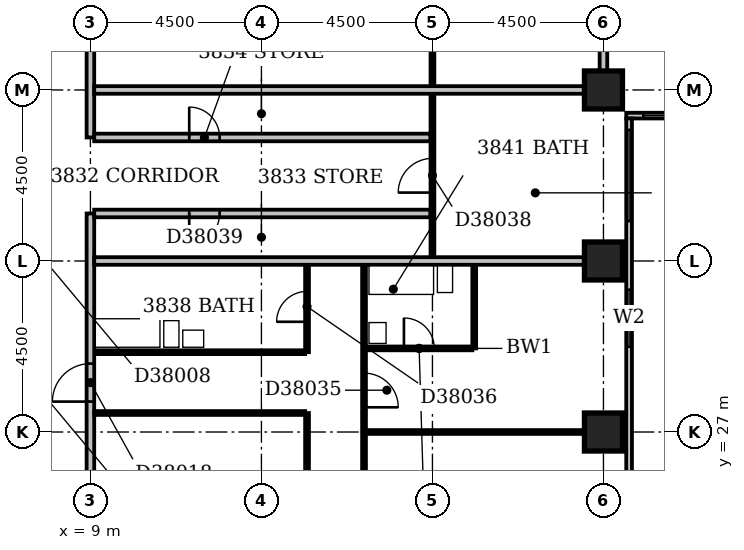
"""IFC4 building model, lengths in metres.
Left out: names, types, materials, properties, quantities, classifications, styles, units other than length and angle.
Written with IfcOpenShell. Run it as: python <this file> out.ifc"""

import sys

from ifc_helpers import new_model, si_unit, direction, frame, frame_2d, origin, origin_2d, place, context, subcontext, project, spatial, rectangle, extrude, element, fill, save


model = new_model("IFC4")
c1 = context("Model", 3, precision=1e-05, world=origin(), true_north=direction((0.0, 1.0)))
c2 = subcontext(c1, "Body", "Model", "MODEL_VIEW")
j1 = project(units=[si_unit("LENGTHUNIT", "METRE"), si_unit("PLANEANGLEUNIT", "RADIAN")], contexts=[c1])
p1 = place(None, origin())
s1 = spatial("IfcSite", under=j1, at=p1, CompositionType="ELEMENT")
p2 = place(p1, origin())
s2 = spatial("IfcBuilding", under=s1, at=p2, CompositionType="ELEMENT")
p3 = place(p2, frame((0.0, 0.0, 152.0)))
s3 = spatial("IfcBuildingStorey", under=s2, at=p3, CompositionType="ELEMENT", Elevation=152.0)
for number, where, z_axis, x_axis in (
    (1, (22.5, 27.0, -0.3), (0.0, 0.0, 1.0), (1.0, 0.0, 0.0)),
    (2, (22.5, 31.5, -0.3), (0.0, 0.0, 1.0), (1.0, 0.0, 0.0)),
    (3, (22.5, 36.0, -0.3), (0.0, 0.0, 1.0), (1.0, 0.0, 0.0)),
):
    element("IfcColumn", number, at=place(p3, frame(where, z_axis=z_axis, x_axis=x_axis)), inside=s3, PredefinedType="COLUMN", context=c2, shape_type="SweptSolid", body=[
        extrude(rectangle(XDim=1.0, YDim=1.0, at=origin_2d()), origin(), (0.0, 0.0, 1.0), 3.6),
    ])
p4 = place(p3, frame((23.175, 17.4, 0.0), z_axis=(0.0, 0.0, 1.0), x_axis=(0.0, 1.0, 0.0)))
e4 = element("IfcWall", 4, at=p4, inside=s3, PredefinedType="STANDARD", context=c2, shape_type="SweptSolid", body=[
    extrude(rectangle(XDim=17.85, YDim=0.15, at=frame_2d((8.925, 0.0))), origin(), (0.0, 0.0, 1.0), 2.7),
])
p5 = place(p4, frame((1.65, 0.0, 0.6)))
e5 = element("IfcOpeningElement", 5, at=p5, cuts=e4, PredefinedType="OPENING", context=c2, shape_type="SweptSolid", body=[
    extrude(rectangle(XDim=2.4, YDim=1.8, at=frame_2d((1.2, 0.9))), frame((0.0, 0.087, 0.0), z_axis=(0.0, -1.0, 0.0), x_axis=(1.0, 0.0, 0.0)), (0.0, 0.0, 1.0), 0.174),
])
p6 = place(p4, frame((6.15, 0.0, 0.6)))
e6 = element("IfcOpeningElement", 6, at=p6, cuts=e4, PredefinedType="OPENING", context=c2, shape_type="SweptSolid", body=[
    extrude(rectangle(XDim=2.4, YDim=1.8, at=frame_2d((1.2, 0.9))), frame((0.0, 0.087, 0.0), z_axis=(0.0, -1.0, 0.0), x_axis=(1.0, 0.0, 0.0)), (0.0, 0.0, 1.0), 0.174),
])
p7 = place(p4, frame((11.844, 0.0, 0.6)))
e7 = element("IfcOpeningElement", 7, at=p7, cuts=e4, PredefinedType="OPENING", context=c2, shape_type="SweptSolid", body=[
    extrude(rectangle(XDim=1.5, YDim=1.8, at=frame_2d((0.75, 0.9))), frame((0.0, 0.087, 0.0), z_axis=(0.0, -1.0, 0.0), x_axis=(1.0, 0.0, 0.0)), (0.0, 0.0, 1.0), 0.174),
])
p8 = place(p4, frame((15.15, 0.0, 0.6)))
e8 = element("IfcOpeningElement", 8, at=p8, cuts=e4, PredefinedType="OPENING", context=c2, shape_type="SweptSolid", body=[
    extrude(rectangle(XDim=2.4, YDim=1.8, at=frame_2d((1.2, 0.9))), frame((0.0, 0.087, 0.0), z_axis=(0.0, -1.0, 0.0), x_axis=(1.0, 0.0, 0.0)), (0.0, 0.0, 1.0), 0.174),
])
p9 = place(p3, frame((23.1, 35.325, 0.0), z_axis=(0.0, 0.0, 1.0), x_axis=(1.0, 0.0, 0.0)))
e9 = element("IfcWall", 9, at=p9, inside=s3, PredefinedType="STANDARD", context=c2, shape_type="SweptSolid", body=[
    extrude(rectangle(XDim=45.15, YDim=0.15, at=frame_2d((22.575, 0.0))), origin(), (0.0, 0.0, 1.0), 2.7),
])
p10 = place(p9, frame((0.45, 0.0, 0.6)))
e10 = element("IfcOpeningElement", 10, at=p10, cuts=e9, PredefinedType="OPENING", context=c2, shape_type="SweptSolid", body=[
    extrude(rectangle(XDim=2.4, YDim=1.8, at=frame_2d((1.2, 0.9))), frame((0.0, 0.087, 0.0), z_axis=(0.0, -1.0, 0.0), x_axis=(1.0, 0.0, 0.0)), (0.0, 0.0, 1.0), 0.174),
])
p11 = place(p9, frame((4.738, 0.0, 0.6)))
e11 = element("IfcOpeningElement", 11, at=p11, cuts=e9, PredefinedType="OPENING", context=c2, shape_type="SweptSolid", body=[
    extrude(rectangle(XDim=2.1, YDim=1.8, at=frame_2d((1.05, 0.9))), frame((0.0, 0.087, 0.0), z_axis=(0.0, -1.0, 0.0), x_axis=(1.0, 0.0, 0.0)), (0.0, 0.0, 1.0), 0.174),
])
p12 = place(p9, frame((9.45, 0.0, 0.6)))
e12 = element("IfcOpeningElement", 12, at=p12, cuts=e9, PredefinedType="OPENING", context=c2, shape_type="SweptSolid", body=[
    extrude(rectangle(XDim=2.4, YDim=1.8, at=frame_2d((1.2, 0.9))), frame((0.0, 0.087, 0.0), z_axis=(0.0, -1.0, 0.0), x_axis=(1.0, 0.0, 0.0)), (0.0, 0.0, 1.0), 0.174),
])
p13 = place(p9, frame((13.95, 0.0, 0.6)))
e13 = element("IfcOpeningElement", 13, at=p13, cuts=e9, PredefinedType="OPENING", context=c2, shape_type="SweptSolid", body=[
    extrude(rectangle(XDim=2.4, YDim=1.8, at=frame_2d((1.2, 0.9))), frame((0.0, 0.087, 0.0), z_axis=(0.0, -1.0, 0.0), x_axis=(1.0, 0.0, 0.0)), (0.0, 0.0, 1.0), 0.174),
])
p14 = place(p9, frame((19.34, 0.0, 0.6)))
e14 = element("IfcOpeningElement", 14, at=p14, cuts=e9, PredefinedType="OPENING", context=c2, shape_type="SweptSolid", body=[
    extrude(rectangle(XDim=1.8, YDim=1.8, at=frame_2d((0.9, 0.9))), frame((0.0, 0.087, 0.0), z_axis=(0.0, -1.0, 0.0), x_axis=(1.0, 0.0, 0.0)), (0.0, 0.0, 1.0), 0.174),
])
p15 = place(p9, frame((22.95, 0.0, 0.6)))
e15 = element("IfcOpeningElement", 15, at=p15, cuts=e9, PredefinedType="OPENING", context=c2, shape_type="SweptSolid", body=[
    extrude(rectangle(XDim=2.4, YDim=1.8, at=frame_2d((1.2, 0.9))), frame((0.0, 0.087, 0.0), z_axis=(0.0, -1.0, 0.0), x_axis=(1.0, 0.0, 0.0)), (0.0, 0.0, 1.0), 0.174),
])
p16 = place(p9, frame((27.45, 0.0, 0.6)))
e16 = element("IfcOpeningElement", 16, at=p16, cuts=e9, PredefinedType="OPENING", context=c2, shape_type="SweptSolid", body=[
    extrude(rectangle(XDim=2.4, YDim=1.8, at=frame_2d((1.2, 0.9))), frame((0.0, 0.087, 0.0), z_axis=(0.0, -1.0, 0.0), x_axis=(1.0, 0.0, 0.0)), (0.0, 0.0, 1.0), 0.174),
])
p17 = place(p9, frame((31.95, 0.0, 0.6)))
e17 = element("IfcOpeningElement", 17, at=p17, cuts=e9, PredefinedType="OPENING", context=c2, shape_type="SweptSolid", body=[
    extrude(rectangle(XDim=2.4, YDim=1.8, at=frame_2d((1.2, 0.9))), frame((0.0, 0.087, 0.0), z_axis=(0.0, -1.0, 0.0), x_axis=(1.0, 0.0, 0.0)), (0.0, 0.0, 1.0), 0.174),
])
p18 = place(p9, frame((38.27, 0.0, 0.6)))
e18 = element("IfcOpeningElement", 18, at=p18, cuts=e9, PredefinedType="OPENING", context=c2, shape_type="SweptSolid", body=[
    extrude(rectangle(XDim=0.9, YDim=1.8, at=frame_2d((0.45, 0.9))), frame((0.0, 0.087, 0.0), z_axis=(0.0, -1.0, 0.0), x_axis=(1.0, 0.0, 0.0)), (0.0, 0.0, 1.0), 0.174),
])
p19 = place(p9, frame((40.95, 0.0, 0.6)))
e19 = element("IfcOpeningElement", 19, at=p19, cuts=e9, PredefinedType="OPENING", context=c2, shape_type="SweptSolid", body=[
    extrude(rectangle(XDim=2.4, YDim=1.8, at=frame_2d((1.2, 0.9))), frame((0.0, 0.087, 0.0), z_axis=(0.0, -1.0, 0.0), x_axis=(1.0, 0.0, 0.0)), (0.0, 0.0, 1.0), 0.174),
])
p20 = place(p3, frame((9.0, 5.0, 0.0), z_axis=(0.0, 0.0, 1.0), x_axis=(0.0, 1.0, 0.0)))
e20 = element("IfcWall", 20, at=p20, inside=s3, PredefinedType="PARTITIONING", context=c2, shape_type="SweptSolid", body=[
    extrude(rectangle(XDim=27.75, YDim=0.2, at=frame_2d((13.875, 0.0))), origin(), (0.0, 0.0, 1.0), 3.3),
])
p21 = place(p20, frame((22.8, 0.0, 0.0)))
e21 = element("IfcOpeningElement", 21, at=p21, cuts=e20, PredefinedType="OPENING", context=c2, shape_type="SweptSolid", body=[
    extrude(rectangle(XDim=1.0, YDim=2.1, at=frame_2d((0.5, 1.05))), frame((0.0, 0.112, 0.0), z_axis=(0.0, -1.0, 0.0), x_axis=(1.0, 0.0, 0.0)), (0.0, 0.0, 1.0), 0.224),
])
p22 = place(p20, frame((14.95, 0.0, 0.0)))
e22 = element("IfcOpeningElement", 22, at=p22, cuts=e20, PredefinedType="OPENING", context=c2, shape_type="SweptSolid", body=[
    extrude(rectangle(XDim=1.0, YDim=2.1, at=frame_2d((0.5, 1.05))), frame((0.0, 0.112, 0.0), z_axis=(0.0, -1.0, 0.0), x_axis=(1.0, 0.0, 0.0)), (0.0, 0.0, 1.0), 0.224),
])
p23 = place(p20, frame((10.45, 0.0, 0.0)))
e23 = element("IfcOpeningElement", 23, at=p23, cuts=e20, PredefinedType="OPENING", context=c2, shape_type="SweptSolid", body=[
    extrude(rectangle(XDim=1.0, YDim=2.1, at=frame_2d((0.5, 1.05))), frame((0.0, 0.112, 0.0), z_axis=(0.0, -1.0, 0.0), x_axis=(1.0, 0.0, 0.0)), (0.0, 0.0, 1.0), 0.224),
])
p24 = place(p20, frame((5.95, 0.0, 0.0)))
e24 = element("IfcOpeningElement", 24, at=p24, cuts=e20, PredefinedType="OPENING", context=c2, shape_type="SweptSolid", body=[
    extrude(rectangle(XDim=1.0, YDim=2.1, at=frame_2d((0.5, 1.05))), frame((0.0, 0.112, 0.0), z_axis=(0.0, -1.0, 0.0), x_axis=(1.0, 0.0, 0.0)), (0.0, 0.0, 1.0), 0.224),
])
p25 = place(p20, frame((1.5, 0.0, 0.0)))
e25 = element("IfcOpeningElement", 25, at=p25, cuts=e20, PredefinedType="OPENING", context=c2, shape_type="SweptSolid", body=[
    extrude(rectangle(XDim=0.9, YDim=2.1, at=frame_2d((0.45, 1.05))), frame((0.0, 0.112, 0.0), z_axis=(0.0, -1.0, 0.0), x_axis=(1.0, 0.0, 0.0)), (0.0, 0.0, 1.0), 0.224),
])
p26 = place(p3, frame((14.7, 22.6, 0.0), z_axis=(0.0, 0.0, 1.0), x_axis=(0.0, 1.0, 0.0)))
e26 = element("IfcWall", 26, at=p26, inside=s3, PredefinedType="PARTITIONING", context=c2, shape_type="SweptSolid", body=[
    extrude(rectangle(XDim=4.9, YDim=0.1, at=frame_2d((2.45, 0.0))), origin(), (0.0, 0.0, 1.0), 3.3),
])
p27 = place(p26, frame((1.95, 0.0, 0.0)))
e27 = element("IfcOpeningElement", 27, at=p27, cuts=e26, PredefinedType="OPENING", context=c2, shape_type="SweptSolid", body=[
    extrude(rectangle(XDim=0.9, YDim=2.1, at=frame_2d((0.45, 1.05))), frame((0.0, 0.062, 0.0), z_axis=(0.0, -1.0, 0.0), x_axis=(1.0, 0.0, 0.0)), (0.0, 0.0, 1.0), 0.124),
])
p28 = place(p3, frame((16.2, 22.6, 0.0), z_axis=(0.0, 0.0, 1.0), x_axis=(0.0, 1.0, 0.0)))
e28 = element("IfcWall", 28, at=p28, inside=s3, PredefinedType="PARTITIONING", context=c2, shape_type="SweptSolid", body=[
    extrude(rectangle(XDim=8.8, YDim=0.1, at=frame_2d((4.4, 0.0))), origin(), (0.0, 0.0, 1.0), 3.3),
])
p29 = place(p28, frame((1.7, 0.0, 0.0)))
e29 = element("IfcOpeningElement", 29, at=p29, cuts=e28, PredefinedType="OPENING", context=c2, shape_type="SweptSolid", body=[
    extrude(rectangle(XDim=0.9, YDim=2.1, at=frame_2d((0.45, 1.05))), frame((0.0, 0.062, 0.0), z_axis=(0.0, -1.0, 0.0), x_axis=(1.0, 0.0, 0.0)), (0.0, 0.0, 1.0), 0.124),
])
p30 = place(p28, frame((5.05, 0.0, 0.0)))
e30 = element("IfcOpeningElement", 30, at=p30, cuts=e28, PredefinedType="OPENING", context=c2, shape_type="SweptSolid", body=[
    extrude(rectangle(XDim=0.9, YDim=2.1, at=frame_2d((0.45, 1.05))), frame((0.0, 0.062, 0.0), z_axis=(0.0, -1.0, 0.0), x_axis=(1.0, 0.0, 0.0)), (0.0, 0.0, 1.0), 0.124),
])
p31 = place(p3, frame((16.25, 27.0, 0.0), z_axis=(0.0, 0.0, 1.0), x_axis=(1.0, 0.0, 0.0)))
e31 = element("IfcWall", 31, at=p31, inside=s3, PredefinedType="PARTITIONING", context=c2, shape_type="SweptSolid", body=[
    extrude(rectangle(XDim=5.75, YDim=0.1, at=frame_2d((2.875, 0.0))), origin(), (0.0, 0.0, 1.0), 2.7),
])
p32 = place(p3, frame((9.1, 27.5, 0.0), z_axis=(0.0, 0.0, 1.0), x_axis=(1.0, 0.0, 0.0)))
e32 = element("IfcWall", 32, at=p32, inside=s3, PredefinedType="PARTITIONING", context=c2, shape_type="SweptSolid", body=[
    extrude(rectangle(XDim=5.55, YDim=0.1, at=frame_2d((2.775, 0.0))), origin(), (0.0, 0.0, 1.0), 2.7),
])
p33 = place(p3, frame((9.1, 29.1, 0.0), z_axis=(0.0, 0.0, 1.0), x_axis=(1.0, 0.0, 0.0)))
e33 = element("IfcWall", 33, at=p33, inside=s3, PredefinedType="PLUMBINGWALL", context=c2, shape_type="SweptSolid", body=[
    extrude(rectangle(XDim=5.55, YDim=0.1, at=frame_2d((2.775, 0.0))), origin(), (0.0, 0.0, 1.0), 3.3),
])
p34 = place(p3, frame((14.7, 29.1, 0.0), z_axis=(0.0, 0.0, 1.0), x_axis=(0.0, 1.0, 0.0)))
e34 = element("IfcWall", 34, at=p34, inside=s3, PredefinedType="PARTITIONING", context=c2, shape_type="SweptSolid", body=[
    extrude(rectangle(XDim=2.3, YDim=0.1, at=frame_2d((1.15, 0.0))), origin(), (0.0, 0.0, 1.0), 3.3),
])
p35 = place(p34, frame((0.8, 0.0, 0.0)))
e35 = element("IfcOpeningElement", 35, at=p35, cuts=e34, PredefinedType="OPENING", context=c2, shape_type="SweptSolid", body=[
    extrude(rectangle(XDim=0.8, YDim=2.1, at=frame_2d((0.4, 1.05))), frame((0.0, 0.062, 0.0), z_axis=(0.0, -1.0, 0.0), x_axis=(1.0, 0.0, 0.0)), (0.0, 0.0, 1.0), 0.124),
])
p36 = place(p3, frame((16.25, 29.2, 0.0), z_axis=(0.0, 0.0, 1.0), x_axis=(1.0, 0.0, 0.0)))
e36 = element("IfcWall", 36, at=p36, inside=s3, PredefinedType="PLUMBINGWALL", context=c2, shape_type="SweptSolid", body=[
    extrude(rectangle(XDim=2.8, YDim=0.1, at=frame_2d((1.4, 0.0))), origin(), (0.0, 0.0, 1.0), 3.3),
])
p37 = place(p36, frame((1.0, 0.0, 0.0)))
e37 = element("IfcOpeningElement", 37, at=p37, cuts=e36, PredefinedType="OPENING", context=c2, shape_type="SweptSolid", body=[
    extrude(rectangle(XDim=0.8, YDim=2.1, at=frame_2d((0.4, 1.05))), frame((0.0, 0.062, 0.0), z_axis=(0.0, -1.0, 0.0), x_axis=(1.0, 0.0, 0.0)), (0.0, 0.0, 1.0), 0.124),
])
p38 = place(p3, frame((19.1, 29.2, 0.0), z_axis=(0.0, 0.0, 1.0), x_axis=(0.0, 1.0, 0.0)))
e38 = element("IfcWall", 38, at=p38, inside=s3, PredefinedType="PLUMBINGWALL", context=c2, shape_type="SweptSolid", body=[
    extrude(rectangle(XDim=2.2, YDim=0.1, at=frame_2d((1.1, 0.0))), origin(), (0.0, 0.0, 1.0), 3.3),
])
p39 = place(p3, frame((9.1, 31.5, 0.0), z_axis=(0.0, 0.0, 1.0), x_axis=(1.0, 0.0, 0.0)))
e39 = element("IfcWall", 39, at=p39, inside=s3, PredefinedType="PARTITIONING", context=c2, shape_type="SweptSolid", body=[
    extrude(rectangle(XDim=12.9, YDim=0.2, at=frame_2d((6.45, 0.0))), origin(), (0.0, 0.0, 1.0), 3.3),
])
p40 = place(p3, frame((18.0, 31.6, 0.0), z_axis=(0.0, 0.0, 1.0), x_axis=(0.0, 1.0, 0.0)))
e40 = element("IfcWall", 40, at=p40, inside=s3, PredefinedType="PARTITIONING", context=c2, shape_type="SweptSolid", body=[
    extrude(rectangle(XDim=17.8, YDim=0.1, at=frame_2d((8.9, 0.0))), origin(), (0.0, 0.0, 1.0), 3.3),
])
p41 = place(p40, frame((1.7, 0.0, 0.0)))
e41 = element("IfcOpeningElement", 41, at=p41, cuts=e40, PredefinedType="OPENING", context=c2, shape_type="SweptSolid", body=[
    extrude(rectangle(XDim=0.9, YDim=2.1, at=frame_2d((0.45, 1.05))), frame((0.0, 0.062, 0.0), z_axis=(0.0, -1.0, 0.0), x_axis=(1.0, 0.0, 0.0)), (0.0, 0.0, 1.0), 0.124),
])
p42 = place(p3, frame((9.1, 32.75, 0.0), z_axis=(0.0, 0.0, 1.0), x_axis=(1.0, 0.0, 0.0)))
e42 = element("IfcWall", 42, at=p42, inside=s3, PredefinedType="PARTITIONING", context=c2, shape_type="SweptSolid", body=[
    extrude(rectangle(XDim=8.85, YDim=0.2, at=frame_2d((4.425, 0.0))), origin(), (0.0, 0.0, 1.0), 3.3),
])
p43 = place(p42, frame((2.5, 0.0, 0.0)))
e43 = element("IfcOpeningElement", 43, at=p43, cuts=e42, PredefinedType="OPENING", context=c2, shape_type="SweptSolid", body=[
    extrude(rectangle(XDim=0.8, YDim=2.1, at=frame_2d((0.4, 1.05))), frame((0.0, 0.112, 0.0), z_axis=(0.0, -1.0, 0.0), x_axis=(1.0, 0.0, 0.0)), (0.0, 0.0, 1.0), 0.224),
])
p44 = place(p3, frame((9.0, 34.75, 0.0), z_axis=(0.0, 0.0, 1.0), x_axis=(0.0, 1.0, 0.0)))
e44 = element("IfcWall", 44, at=p44, inside=s3, PredefinedType="PARTITIONING", context=c2, shape_type="SweptSolid", body=[
    extrude(rectangle(XDim=14.75, YDim=0.2, at=frame_2d((7.375, 0.0))), origin(), (0.0, 0.0, 1.0), 3.3),
])
p45 = place(p44, frame((7.5, 0.0, 0.0)))
e45 = element("IfcOpeningElement", 45, at=p45, cuts=e44, PredefinedType="OPENING", context=c2, shape_type="SweptSolid", body=[
    extrude(rectangle(XDim=0.9, YDim=2.1, at=frame_2d((0.45, 1.05))), frame((0.0, 0.112, 0.0), z_axis=(0.0, -1.0, 0.0), x_axis=(1.0, 0.0, 0.0)), (0.0, 0.0, 1.0), 0.224),
])
p46 = place(p3, frame((9.1, 34.75, 0.0), z_axis=(0.0, 0.0, 1.0), x_axis=(1.0, 0.0, 0.0)))
e46 = element("IfcWall", 46, at=p46, inside=s3, PredefinedType="PARTITIONING", context=c2, shape_type="SweptSolid", body=[
    extrude(rectangle(XDim=8.85, YDim=0.2, at=frame_2d((4.425, 0.0))), origin(), (0.0, 0.0, 1.0), 3.3),
])
p47 = place(p46, frame((2.5, 0.0, 0.0)))
e47 = element("IfcOpeningElement", 47, at=p47, cuts=e46, PredefinedType="OPENING", context=c2, shape_type="SweptSolid", body=[
    extrude(rectangle(XDim=0.8, YDim=2.1, at=frame_2d((0.4, 1.05))), frame((0.0, 0.112, 0.0), z_axis=(0.0, -1.0, 0.0), x_axis=(1.0, 0.0, 0.0)), (0.0, 0.0, 1.0), 0.224),
])
for number, where, z_axis, x_axis in (
    (48, (9.1, 36.0, 0.0), (0.0, 0.0, 1.0), (1.0, 0.0, 0.0)),
    (49, (22.5, 36.5, 0.0), (0.0, 0.0, 1.0), (0.0, 1.0, 0.0)),
):
    element("IfcWall", number, at=place(p3, frame(where, z_axis=z_axis, x_axis=x_axis)), inside=s3, PredefinedType="PARTITIONING", context=c2, shape_type="SweptSolid", body=[
        extrude(rectangle(XDim=12.9, YDim=0.2, at=frame_2d((6.45, 0.0))), origin(), (0.0, 0.0, 1.0), 3.3),
    ])
p48 = place(p7, origin())
e50 = element("IfcWindow", 50, at=p48, inside=s3, PartitioningType="SINGLE_PANEL", PredefinedType="WINDOW", context=c2, shape_type="SweptSolid", body=[
    extrude(rectangle(XDim=1.5, YDim=1.8, at=frame_2d((0.75, 0.9))), frame((0.0, 0.03, 0.0), z_axis=(0.0, -1.0, 0.0), x_axis=(1.0, 0.0, 0.0)), (0.0, 0.0, 1.0), 0.06),
])
fill(e7, e50)
p49 = place(p8, origin())
e51 = element("IfcWindow", 51, at=p49, inside=s3, PartitioningType="SINGLE_PANEL", PredefinedType="WINDOW", context=c2, shape_type="SweptSolid", body=[
    extrude(rectangle(XDim=2.4, YDim=1.8, at=frame_2d((1.2, 0.9))), frame((0.0, 0.03, 0.0), z_axis=(0.0, -1.0, 0.0), x_axis=(1.0, 0.0, 0.0)), (0.0, 0.0, 1.0), 0.06),
])
fill(e8, e51)
p50 = place(p10, origin())
e52 = element("IfcWindow", 52, at=p50, inside=s3, PartitioningType="SINGLE_PANEL", PredefinedType="WINDOW", context=c2, shape_type="SweptSolid", body=[
    extrude(rectangle(XDim=2.4, YDim=1.8, at=frame_2d((1.2, 0.9))), frame((0.0, 0.03, 0.0), z_axis=(0.0, -1.0, 0.0), x_axis=(1.0, 0.0, 0.0)), (0.0, 0.0, 1.0), 0.06),
])
fill(e10, e52)
p51 = place(p21, origin())
e53 = element("IfcDoor", 53, at=p51, inside=s3, OperationType="SINGLE_SWING_LEFT", PredefinedType="DOOR", context=c2, shape_type="SweptSolid", body=[
    extrude(rectangle(XDim=1.0, YDim=2.1, at=frame_2d((0.5, 1.05))), frame((0.0, 0.025, 0.0), z_axis=(0.0, -1.0, 0.0), x_axis=(1.0, 0.0, 0.0)), (0.0, 0.0, 1.0), 0.05),
])
fill(e21, e53)
p52 = place(p30, frame((0.9, 0.0, 0.0), z_axis=(0.0, 0.0, 1.0), x_axis=(-1.0, 0.0, 0.0)))
e54 = element("IfcDoor", 54, at=p52, inside=s3, OperationType="SINGLE_SWING_RIGHT", PredefinedType="DOOR", context=c2, shape_type="SweptSolid", body=[
    extrude(rectangle(XDim=0.9, YDim=2.1, at=frame_2d((0.45, 1.05))), frame((0.0, 0.025, 0.0), z_axis=(0.0, -1.0, 0.0), x_axis=(1.0, 0.0, 0.0)), (0.0, 0.0, 1.0), 0.05),
])
fill(e30, e54)
p53 = place(p35, origin())
e55 = element("IfcDoor", 55, at=p53, inside=s3, OperationType="SINGLE_SWING_LEFT", PredefinedType="DOOR", context=c2, shape_type="SweptSolid", body=[
    extrude(rectangle(XDim=0.8, YDim=2.1, at=frame_2d((0.4, 1.05))), frame((0.0, 0.025, 0.0), z_axis=(0.0, -1.0, 0.0), x_axis=(1.0, 0.0, 0.0)), (0.0, 0.0, 1.0), 0.05),
])
fill(e35, e55)
p54 = place(p37, origin())
e56 = element("IfcDoor", 56, at=p54, inside=s3, OperationType="SINGLE_SWING_LEFT", PredefinedType="DOOR", context=c2, shape_type="SweptSolid", body=[
    extrude(rectangle(XDim=0.8, YDim=2.1, at=frame_2d((0.4, 1.05))), frame((0.0, 0.025, 0.0), z_axis=(0.0, -1.0, 0.0), x_axis=(1.0, 0.0, 0.0)), (0.0, 0.0, 1.0), 0.05),
])
fill(e37, e56)
p55 = place(p41, origin())
e57 = element("IfcDoor", 57, at=p55, inside=s3, OperationType="SINGLE_SWING_LEFT", PredefinedType="DOOR", context=c2, shape_type="SweptSolid", body=[
    extrude(rectangle(XDim=0.9, YDim=2.1, at=frame_2d((0.45, 1.05))), frame((0.0, 0.025, 0.0), z_axis=(0.0, -1.0, 0.0), x_axis=(1.0, 0.0, 0.0)), (0.0, 0.0, 1.0), 0.05),
])
fill(e41, e57)
p56 = place(p43, frame((0.8, 0.0, 0.0), z_axis=(0.0, 0.0, 1.0), x_axis=(-1.0, 0.0, 0.0)))
e58 = element("IfcDoor", 58, at=p56, inside=s3, OperationType="SINGLE_SWING_RIGHT", PredefinedType="DOOR", context=c2, shape_type="SweptSolid", body=[
    extrude(rectangle(XDim=0.8, YDim=2.1, at=frame_2d((0.4, 1.05))), frame((0.0, 0.025, 0.0), z_axis=(0.0, -1.0, 0.0), x_axis=(1.0, 0.0, 0.0)), (0.0, 0.0, 1.0), 0.05),
])
fill(e43, e58)
p57 = place(p47, origin())
e59 = element("IfcDoor", 59, at=p57, inside=s3, OperationType="SINGLE_SWING_LEFT", PredefinedType="DOOR", context=c2, shape_type="SweptSolid", body=[
    extrude(rectangle(XDim=0.8, YDim=2.1, at=frame_2d((0.4, 1.05))), frame((0.0, 0.025, 0.0), z_axis=(0.0, -1.0, 0.0), x_axis=(1.0, 0.0, 0.0)), (0.0, 0.0, 1.0), 0.05),
])
fill(e47, e59)
save(model, sys.argv[1])
